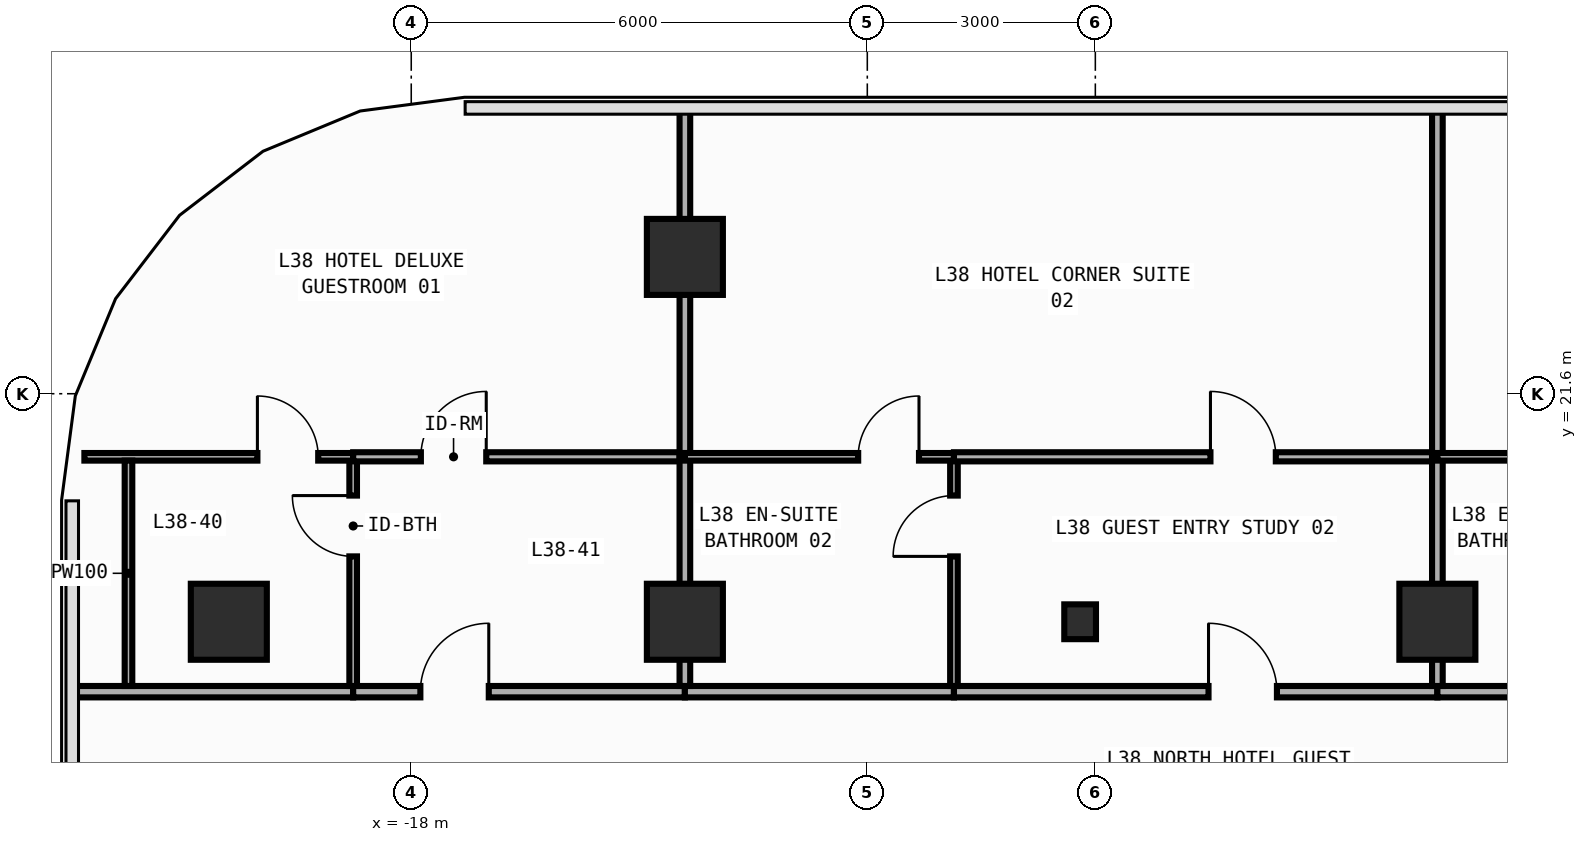
"""IFC4 building model, lengths in metres.
Left out: names, types, materials, properties, quantities, classifications, styles, units other than length and angle.
Written with IfcOpenShell. Run it as: python <this file> out.ifc"""

import sys

from ifc_helpers import new_model, si_unit, direction, frame, frame_2d, origin, origin_2d, place, context, subcontext, project, spatial, rectangle, i_section, extrude, element, fill, save


model = new_model("IFC4")
c1 = context("Model", 3, precision=1e-05, world=origin(), true_north=direction((0.0, 1.0)))
c2 = subcontext(c1, "Body", "Model", "MODEL_VIEW")
j1 = project(units=[si_unit("LENGTHUNIT", "METRE"), si_unit("PLANEANGLEUNIT", "RADIAN")], contexts=[c1])
p1 = place(None, origin())
s1 = spatial("IfcSite", under=j1, at=p1, CompositionType="ELEMENT")
p2 = place(p1, origin())
s2 = spatial("IfcBuilding", under=s1, at=p2, CompositionType="ELEMENT")
p3 = place(p2, frame((0.0, 0.0, 168.8)))
s3 = spatial("IfcBuildingStorey", under=s2, at=p3, CompositionType="ELEMENT", Elevation=168.8)
p4 = place(p3, frame((-9.2, 18.6, 0.0), z_axis=(0.0, 0.0, 1.0), x_axis=(1.0, 0.0, 0.0)))
e1 = element("IfcColumn", 1, at=p4, inside=s3, PredefinedType="COLUMN", context=c2, shape_type="SweptSolid", body=[
    extrude(i_section(OverallWidth=0.417, OverallDepth=0.458, WebThickness=0.03, FlangeThickness=0.05, FilletRadius=0.022, at=origin_2d()), origin(), (0.0, 0.0, 1.0), 3.8),
])
for number, where, z_axis, x_axis in (
    (2, (-20.4, 18.6, 0.0), (0.0, 0.0, 1.0), (1.0, 0.0, 0.0)),
    (3, (-14.4, 18.6, 0.0), (0.0, 0.0, 1.0), (1.0, 0.0, 0.0)),
    (4, (-4.5, 18.6, 0.0), (0.0, 0.0, 1.0), (1.0, 0.0, 0.0)),
    (5, (-14.4, 23.4, 0.0), (0.0, 0.0, 1.0), (1.0, 0.0, 0.0)),
):
    element("IfcColumn", number, at=place(p3, frame(where, z_axis=z_axis, x_axis=x_axis)), inside=s3, PredefinedType="COLUMN", context=c2, shape_type="SweptSolid", body=[
        extrude(rectangle(XDim=1.0, YDim=1.0, at=origin_2d()), origin(), (0.0, 0.0, 1.0), 3.8),
    ])
p5 = place(p3, frame((-22.455, 17.68, 0.0), z_axis=(0.0, 0.0, 1.0), x_axis=(1.0, 0.0, 0.0)))
e6 = element("IfcWall", 6, at=p5, inside=s3, PredefinedType="PARTITIONING", context=c2, shape_type="SweptSolid", body=[
    extrude(rectangle(XDim=3.691, YDim=0.15, at=frame_2d((1.846, 0.0))), origin(), (0.0, 0.0, 1.0), 3.54),
])
p6 = place(p3, frame((-18.764, 17.68, 0.0), z_axis=(0.0, 0.0, 1.0), x_axis=(1.0, 0.0, 0.0)))
e7 = element("IfcWall", 7, at=p6, inside=s3, PredefinedType="PARTITIONING", context=c2, shape_type="SweptSolid", body=[
    extrude(rectangle(XDim=4.364, YDim=0.15, at=frame_2d((2.182, 0.0))), origin(), (0.0, 0.0, 1.0), 3.54),
])
p7 = place(p6, frame((0.884, 0.0, 0.0)))
e8 = element("IfcOpeningElement", 8, at=p7, cuts=e7, PredefinedType="OPENING", context=c2, shape_type="SweptSolid", body=[
    extrude(rectangle(XDim=0.9, YDim=2.15, at=frame_2d((0.45, 1.075))), frame((0.0, 0.085, 0.0), z_axis=(0.0, -1.0, 0.0), x_axis=(1.0, 0.0, 0.0)), (0.0, 0.0, 1.0), 0.17),
])
p8 = place(p3, frame((-14.4, 17.68, 0.0), z_axis=(0.0, 0.0, 1.0), x_axis=(1.0, 0.0, 0.0)))
e9 = element("IfcWall", 9, at=p8, inside=s3, PredefinedType="PARTITIONING", context=c2, shape_type="SweptSolid", body=[
    extrude(rectangle(XDim=3.54, YDim=0.15, at=frame_2d((1.77, 0.0))), origin(), (0.0, 0.0, 1.0), 3.54),
])
p9 = place(p3, frame((-10.86, 17.68, 0.0), z_axis=(0.0, 0.0, 1.0), x_axis=(1.0, 0.0, 0.0)))
e10 = element("IfcWall", 10, at=p9, inside=s3, PredefinedType="PARTITIONING", context=c2, shape_type="SweptSolid", body=[
    extrude(rectangle(XDim=6.36, YDim=0.15, at=frame_2d((3.18, 0.0))), origin(), (0.0, 0.0, 1.0), 3.54),
])
p10 = place(p9, frame((3.349, 0.0, 0.0)))
e11 = element("IfcOpeningElement", 11, at=p10, cuts=e10, PredefinedType="OPENING", context=c2, shape_type="SweptSolid", body=[
    extrude(rectangle(XDim=0.9, YDim=2.15, at=frame_2d((0.45, 1.075))), frame((0.0, 0.085, 0.0), z_axis=(0.0, -1.0, 0.0), x_axis=(1.0, 0.0, 0.0)), (0.0, 0.0, 1.0), 0.17),
])
p11 = place(p3, frame((-4.5, 17.68, 0.0), z_axis=(0.0, 0.0, 1.0), x_axis=(1.0, 0.0, 0.0)))
e12 = element("IfcWall", 12, at=p11, inside=s3, PredefinedType="PARTITIONING", context=c2, shape_type="SweptSolid", body=[
    extrude(rectangle(XDim=3.54, YDim=0.15, at=frame_2d((1.77, 0.0))), origin(), (0.0, 0.0, 1.0), 3.54),
])
p12 = place(p3, frame((-18.764, 17.755, 0.0), z_axis=(0.0, 0.0, 1.0), x_axis=(0.0, 1.0, 0.0)))
e13 = element("IfcWall", 13, at=p12, inside=s3, PredefinedType="PARTITIONING", context=c2, shape_type="SweptSolid", body=[
    extrude(rectangle(XDim=2.965, YDim=0.1, at=frame_2d((1.482, 0.0))), origin(), (0.0, 0.0, 1.0), 3.54),
])
p13 = place(p12, frame((1.705, 0.0, 0.0)))
e14 = element("IfcOpeningElement", 14, at=p13, cuts=e13, PredefinedType="OPENING", context=c2, shape_type="SweptSolid", body=[
    extrude(rectangle(XDim=0.8, YDim=2.1, at=frame_2d((0.4, 1.05))), frame((0.0, 0.06, 0.0), z_axis=(0.0, -1.0, 0.0), x_axis=(1.0, 0.0, 0.0)), (0.0, 0.0, 1.0), 0.12),
])
p14 = place(p3, frame((-22.3, 20.77, 0.0), z_axis=(0.0, 0.0, 1.0), x_axis=(1.0, 0.0, 0.0)))
e15 = element("IfcWall", 15, at=p14, inside=s3, PredefinedType="PARTITIONING", context=c2, shape_type="SweptSolid", body=[
    extrude(rectangle(XDim=3.536, YDim=0.1, at=frame_2d((1.768, 0.0))), origin(), (0.0, 0.0, 1.0), 3.54),
])
p15 = place(p14, frame((2.276, 0.0, 0.0)))
e16 = element("IfcOpeningElement", 16, at=p15, cuts=e15, PredefinedType="OPENING", context=c2, shape_type="SweptSolid", body=[
    extrude(rectangle(XDim=0.8, YDim=2.1, at=frame_2d((0.4, 1.05))), frame((0.0, 0.06, 0.0), z_axis=(0.0, -1.0, 0.0), x_axis=(1.0, 0.0, 0.0)), (0.0, 0.0, 1.0), 0.12),
])
p16 = place(p3, frame((-18.764, 20.77, 0.0), z_axis=(0.0, 0.0, 1.0), x_axis=(1.0, 0.0, 0.0)))
e17 = element("IfcWall", 17, at=p16, inside=s3, PredefinedType="PARTITIONING", context=c2, shape_type="SweptSolid", body=[
    extrude(rectangle(XDim=4.364, YDim=0.12, at=frame_2d((2.182, 0.0))), origin(), (0.0, 0.0, 1.0), 3.54),
])
p17 = place(p16, frame((0.891, 0.0, 0.0)))
e18 = element("IfcOpeningElement", 18, at=p17, cuts=e17, PredefinedType="OPENING", context=c2, shape_type="SweptSolid", body=[
    extrude(rectangle(XDim=0.86, YDim=2.15, at=frame_2d((0.43, 1.075))), frame((0.0, 0.07, 0.0), z_axis=(0.0, -1.0, 0.0), x_axis=(1.0, 0.0, 0.0)), (0.0, 0.0, 1.0), 0.14),
])
p18 = place(p3, frame((-14.4, 17.755, 0.0), z_axis=(0.0, 0.0, 1.0), x_axis=(0.0, 1.0, 0.0)))
e19 = element("IfcWall", 19, at=p18, inside=s3, PredefinedType="PARTITIONING", context=c2, shape_type="SweptSolid", body=[
    extrude(rectangle(XDim=3.015, YDim=0.14, at=frame_2d((1.508, 0.0))), origin(), (0.0, 0.0, 1.0), 2.952),
])
p19 = place(p3, frame((-14.4, 20.77, 0.0), z_axis=(0.0, 0.0, 1.0), x_axis=(0.0, 1.0, 0.0)))
e20 = element("IfcWall", 20, at=p19, inside=s3, PredefinedType="PARTITIONING", context=c2, shape_type="SweptSolid", body=[
    extrude(rectangle(XDim=4.585, YDim=0.14, at=frame_2d((2.292, 0.0))), origin(), (0.0, 0.0, 1.0), 2.952),
])
p20 = place(p3, frame((-10.86, 17.755, 0.0), z_axis=(0.0, 0.0, 1.0), x_axis=(0.0, 1.0, 0.0)))
e21 = element("IfcWall", 21, at=p20, inside=s3, PredefinedType="PARTITIONING", context=c2, shape_type="SweptSolid", body=[
    extrude(rectangle(XDim=2.965, YDim=0.1, at=frame_2d((1.482, 0.0))), origin(), (0.0, 0.0, 1.0), 3.54),
])
p21 = place(p20, frame((1.705, 0.0, 0.0)))
e22 = element("IfcOpeningElement", 22, at=p21, cuts=e21, PredefinedType="OPENING", context=c2, shape_type="SweptSolid", body=[
    extrude(rectangle(XDim=0.8, YDim=2.1, at=frame_2d((0.4, 1.05))), frame((0.0, 0.06, 0.0), z_axis=(0.0, -1.0, 0.0), x_axis=(1.0, 0.0, 0.0)), (0.0, 0.0, 1.0), 0.12),
])
p22 = place(p3, frame((-14.4, 20.77, 0.0), z_axis=(0.0, 0.0, 1.0), x_axis=(1.0, 0.0, 0.0)))
e23 = element("IfcWall", 23, at=p22, inside=s3, PredefinedType="PARTITIONING", context=c2, shape_type="SweptSolid", body=[
    extrude(rectangle(XDim=3.54, YDim=0.1, at=frame_2d((1.77, 0.0))), origin(), (0.0, 0.0, 1.0), 3.54),
])
p23 = place(p22, frame((2.28, 0.0, 0.0)))
e24 = element("IfcOpeningElement", 24, at=p23, cuts=e23, PredefinedType="OPENING", context=c2, shape_type="SweptSolid", body=[
    extrude(rectangle(XDim=0.8, YDim=2.1, at=frame_2d((0.4, 1.05))), frame((0.0, 0.06, 0.0), z_axis=(0.0, -1.0, 0.0), x_axis=(1.0, 0.0, 0.0)), (0.0, 0.0, 1.0), 0.12),
])
p24 = place(p3, frame((-10.86, 20.77, 0.0), z_axis=(0.0, 0.0, 1.0), x_axis=(1.0, 0.0, 0.0)))
e25 = element("IfcWall", 25, at=p24, inside=s3, PredefinedType="PARTITIONING", context=c2, shape_type="SweptSolid", body=[
    extrude(rectangle(XDim=6.36, YDim=0.12, at=frame_2d((3.18, 0.0))), origin(), (0.0, 0.0, 1.0), 3.54),
])
p25 = place(p24, frame((3.375, 0.0, 0.0)))
e26 = element("IfcOpeningElement", 26, at=p25, cuts=e25, PredefinedType="OPENING", context=c2, shape_type="SweptSolid", body=[
    extrude(rectangle(XDim=0.86, YDim=2.15, at=frame_2d((0.43, 1.075))), frame((0.0, 0.07, 0.0), z_axis=(0.0, -1.0, 0.0), x_axis=(1.0, 0.0, 0.0)), (0.0, 0.0, 1.0), 0.14),
])
p26 = place(p3, frame((-4.5, 17.755, 0.0), z_axis=(0.0, 0.0, 1.0), x_axis=(0.0, 1.0, 0.0)))
e27 = element("IfcWall", 27, at=p26, inside=s3, PredefinedType="PARTITIONING", context=c2, shape_type="SweptSolid", body=[
    extrude(rectangle(XDim=3.015, YDim=0.14, at=frame_2d((1.508, 0.0))), origin(), (0.0, 0.0, 1.0), 3.54),
])
p27 = place(p3, frame((-4.5, 20.77, 0.0), z_axis=(0.0, 0.0, 1.0), x_axis=(0.0, 1.0, 0.0)))
e28 = element("IfcWall", 28, at=p27, inside=s3, PredefinedType="PARTITIONING", context=c2, shape_type="SweptSolid", body=[
    extrude(rectangle(XDim=4.585, YDim=0.14, at=frame_2d((2.292, 0.0))), origin(), (0.0, 0.0, 1.0), 3.54),
])
p28 = place(p3, frame((-4.5, 20.77, 0.0), z_axis=(0.0, 0.0, 1.0), x_axis=(1.0, 0.0, 0.0)))
e29 = element("IfcWall", 29, at=p28, inside=s3, PredefinedType="PARTITIONING", context=c2, shape_type="SweptSolid", body=[
    extrude(rectangle(XDim=3.54, YDim=0.1, at=frame_2d((1.77, 0.0))), origin(), (0.0, 0.0, 1.0), 3.54),
])
p29 = place(p28, frame((1.875, 0.0, 0.0)))
e30 = element("IfcOpeningElement", 30, at=p29, cuts=e29, PredefinedType="OPENING", context=c2, shape_type="SweptSolid", body=[
    extrude(rectangle(XDim=0.8, YDim=2.1, at=frame_2d((0.4, 1.05))), frame((0.0, 0.06, 0.0), z_axis=(0.0, -1.0, 0.0), x_axis=(1.0, 0.0, 0.0)), (0.0, 0.0, 1.0), 0.12),
])
p30 = place(p3, frame((-21.72, 17.755, 0.0), z_axis=(0.0, 0.0, 1.0), x_axis=(0.0, 1.0, 0.0)))
e31 = element("IfcWall", 31, at=p30, inside=s3, PredefinedType="PARTITIONING", context=c2, shape_type="SweptSolid", body=[
    extrude(rectangle(XDim=2.965, YDim=0.1, at=frame_2d((1.482, 0.0))), origin(), (0.0, 0.0, 1.0), 3.54),
])
p31 = place(p7, origin())
e32 = element("IfcDoor", 32, at=p31, inside=s3, OperationType="SINGLE_SWING_RIGHT", PredefinedType="DOOR", context=c2, shape_type="SweptSolid", body=[
    extrude(rectangle(XDim=0.9, YDim=2.15, at=frame_2d((0.45, 1.075))), frame((0.0, 0.025, 0.0), z_axis=(0.0, -1.0, 0.0), x_axis=(1.0, 0.0, 0.0)), (0.0, 0.0, 1.0), 0.05),
])
fill(e8, e32)
p32 = place(p10, origin())
e33 = element("IfcDoor", 33, at=p32, inside=s3, OperationType="SINGLE_SWING_LEFT", PredefinedType="DOOR", context=c2, shape_type="SweptSolid", body=[
    extrude(rectangle(XDim=0.9, YDim=2.15, at=frame_2d((0.45, 1.075))), frame((0.0, 0.025, 0.0), z_axis=(0.0, -1.0, 0.0), x_axis=(1.0, 0.0, 0.0)), (0.0, 0.0, 1.0), 0.05),
])
fill(e11, e33)
p33 = place(p13, origin())
e34 = element("IfcDoor", 34, at=p33, inside=s3, OperationType="SINGLE_SWING_RIGHT", PredefinedType="DOOR", context=c2, shape_type="SweptSolid", body=[
    extrude(rectangle(XDim=0.8, YDim=2.1, at=frame_2d((0.4, 1.05))), frame((0.0, 0.025, 0.0), z_axis=(0.0, -1.0, 0.0), x_axis=(1.0, 0.0, 0.0)), (0.0, 0.0, 1.0), 0.05),
])
fill(e14, e34)
p34 = place(p15, origin())
e35 = element("IfcDoor", 35, at=p34, inside=s3, OperationType="SINGLE_SWING_LEFT", PredefinedType="DOOR", context=c2, shape_type="SweptSolid", body=[
    extrude(rectangle(XDim=0.8, YDim=2.1, at=frame_2d((0.4, 1.05))), frame((0.0, 0.025, 0.0), z_axis=(0.0, -1.0, 0.0), x_axis=(1.0, 0.0, 0.0)), (0.0, 0.0, 1.0), 0.05),
])
fill(e16, e35)
p35 = place(p17, origin())
e36 = element("IfcDoor", 36, at=p35, inside=s3, OperationType="SINGLE_SWING_RIGHT", PredefinedType="DOOR", context=c2, shape_type="SweptSolid", body=[
    extrude(rectangle(XDim=0.86, YDim=2.15, at=frame_2d((0.43, 1.075))), frame((0.0, 0.025, 0.0), z_axis=(0.0, -1.0, 0.0), x_axis=(1.0, 0.0, 0.0)), (0.0, 0.0, 1.0), 0.05),
])
fill(e18, e36)
p36 = place(p21, origin())
e37 = element("IfcDoor", 37, at=p36, inside=s3, OperationType="SINGLE_SWING_LEFT", PredefinedType="DOOR", context=c2, shape_type="SweptSolid", body=[
    extrude(rectangle(XDim=0.8, YDim=2.1, at=frame_2d((0.4, 1.05))), frame((0.0, 0.025, 0.0), z_axis=(0.0, -1.0, 0.0), x_axis=(1.0, 0.0, 0.0)), (0.0, 0.0, 1.0), 0.05),
])
fill(e22, e37)
p37 = place(p23, origin())
e38 = element("IfcDoor", 38, at=p37, inside=s3, OperationType="SINGLE_SWING_RIGHT", PredefinedType="DOOR", context=c2, shape_type="SweptSolid", body=[
    extrude(rectangle(XDim=0.8, YDim=2.1, at=frame_2d((0.4, 1.05))), frame((0.0, 0.025, 0.0), z_axis=(0.0, -1.0, 0.0), x_axis=(1.0, 0.0, 0.0)), (0.0, 0.0, 1.0), 0.05),
])
fill(e24, e38)
p38 = place(p25, origin())
e39 = element("IfcDoor", 39, at=p38, inside=s3, OperationType="SINGLE_SWING_LEFT", PredefinedType="DOOR", context=c2, shape_type="SweptSolid", body=[
    extrude(rectangle(XDim=0.86, YDim=2.15, at=frame_2d((0.43, 1.075))), frame((0.0, 0.025, 0.0), z_axis=(0.0, -1.0, 0.0), x_axis=(1.0, 0.0, 0.0)), (0.0, 0.0, 1.0), 0.05),
])
fill(e26, e39)
save(model, sys.argv[1])
